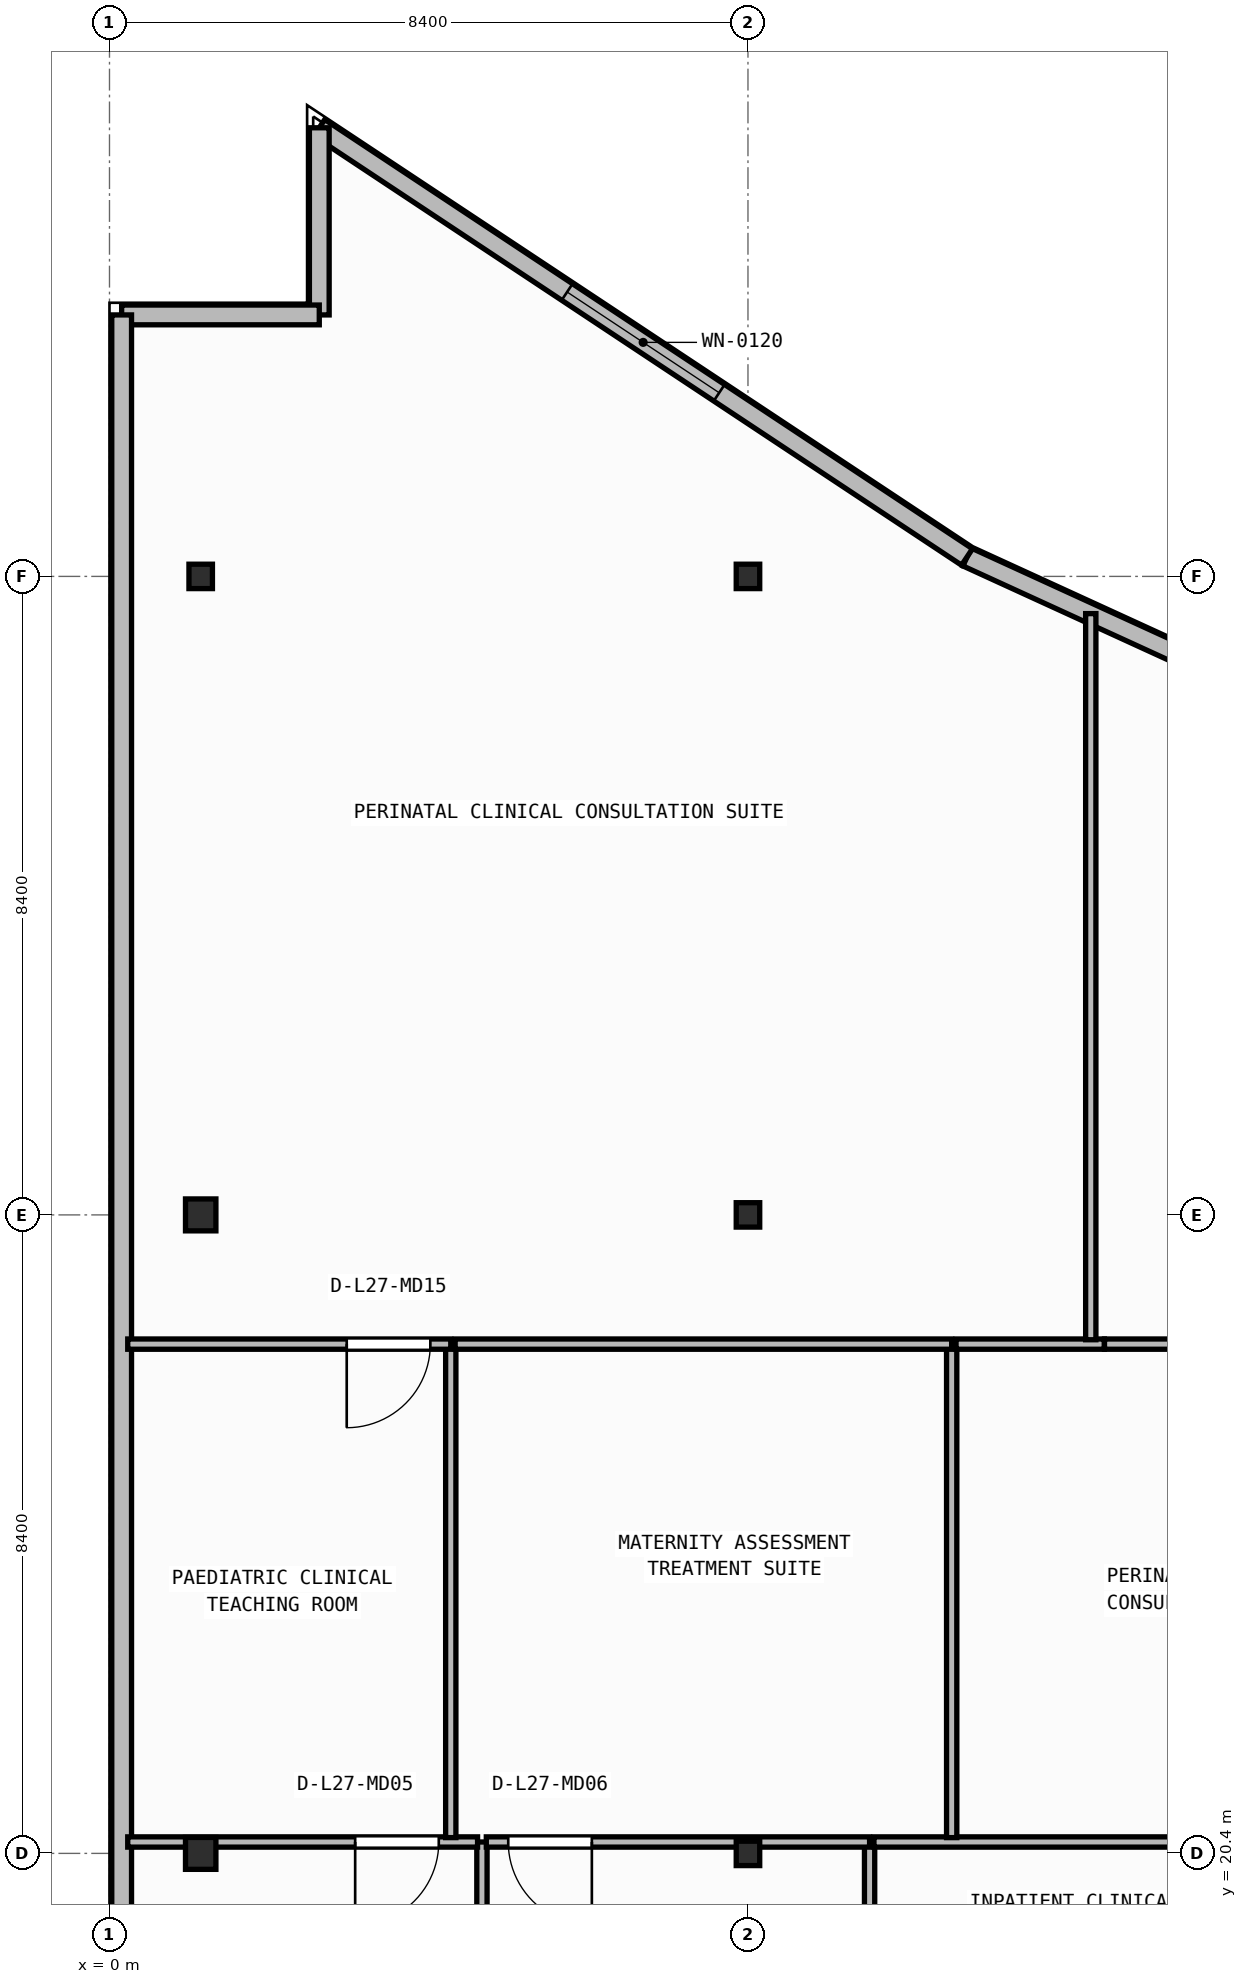
"""IFC4 building model, lengths in metres.
Left out: names, types, materials, properties, quantities, classifications, styles, units other than length and angle.
Written with IfcOpenShell. Run it as: python <this file> out.ifc"""

import sys

from ifc_helpers import new_model, si_unit, direction, frame, frame_2d, origin, origin_2d, place, context, subcontext, project, spatial, rectangle, i_section, extrude, element, fill, save


model = new_model("IFC4")
c1 = context("Model", 3, precision=1e-05, world=origin(), true_north=direction((0.0, 1.0)))
c2 = subcontext(c1, "Body", "Model", "MODEL_VIEW")
j1 = project(units=[si_unit("LENGTHUNIT", "METRE"), si_unit("PLANEANGLEUNIT", "RADIAN")], contexts=[c1])
p1 = place(None, origin())
s1 = spatial("IfcSite", under=j1, at=p1, CompositionType="ELEMENT")
p2 = place(p1, origin())
s2 = spatial("IfcBuilding", under=s1, at=p2, CompositionType="ELEMENT")
p3 = place(p2, frame((0.0, 0.0, 111.25)))
s3 = spatial("IfcBuildingStorey", under=s2, at=p3, CompositionType="ELEMENT", Elevation=111.25)
p4 = place(p3, frame((1.2, 20.4, 0.0), z_axis=(0.0, 0.0, 1.0), x_axis=(1.0, 0.0, 0.0)))
e1 = element("IfcColumn", 1, at=p4, inside=s3, PredefinedType="COLUMN", context=c2, shape_type="SweptSolid", body=[
    extrude(i_section(OverallWidth=0.4, OverallDepth=0.42, WebThickness=0.025, FlangeThickness=0.04, at=origin_2d()), origin(), (0.0, 0.0, 1.0), 3.95),
])
p5 = place(p3, frame((8.4, 20.4, 0.0), z_axis=(0.0, 0.0, 1.0), x_axis=(1.0, 0.0, 0.0)))
e2 = element("IfcColumn", 2, at=p5, inside=s3, PredefinedType="COLUMN", context=c2, shape_type="SweptSolid", body=[
    extrude(i_section(OverallWidth=0.309, OverallDepth=0.321, WebThickness=0.014, FlangeThickness=0.022, FilletRadius=0.017, at=origin_2d()), origin(), (0.0, 0.0, 1.0), 3.95),
])
p6 = place(p3, frame((1.2, 28.8, 0.0), z_axis=(0.0, 0.0, 1.0), x_axis=(1.0, 0.0, 0.0)))
e3 = element("IfcColumn", 3, at=p6, inside=s3, PredefinedType="COLUMN", context=c2, shape_type="SweptSolid", body=[
    extrude(i_section(OverallWidth=0.4, OverallDepth=0.42, WebThickness=0.025, FlangeThickness=0.04, at=origin_2d()), origin(), (0.0, 0.0, 1.0), 3.95),
])
for number, where, z_axis, x_axis in (
    (4, (8.4, 28.8, 0.0), (0.0, 0.0, 1.0), (1.0, 0.0, 0.0)),
    (5, (1.2, 37.2, 0.0), (0.0, 0.0, 1.0), (1.0, 0.0, 0.0)),
    (6, (8.4, 37.2, 0.0), (0.0, 0.0, 1.0), (1.0, 0.0, 0.0)),
):
    element("IfcColumn", number, at=place(p3, frame(where, z_axis=z_axis, x_axis=x_axis)), inside=s3, PredefinedType="COLUMN", context=c2, shape_type="SweptSolid", body=[
        extrude(i_section(OverallWidth=0.309, OverallDepth=0.321, WebThickness=0.014, FlangeThickness=0.022, FilletRadius=0.017, at=origin_2d()), origin(), (0.0, 0.0, 1.0), 3.95),
    ])
p7 = place(p3, frame((23.818, 31.716, 0.0), z_axis=(0.0, 0.0, 1.0), x_axis=(-0.909209527513, 0.416338846471, 0.0)))
e7 = element("IfcWall", 7, at=p7, inside=s3, PredefinedType="STANDARD", context=c2, shape_type="SweptSolid", body=[
    extrude(rectangle(XDim=13.787, YDim=0.26, at=frame_2d((6.894, 0.0))), origin(), (0.0, 0.0, 1.0), 3.71),
])
p8 = place(p7, frame((5.694, 0.0, 0.9)))
e8 = element("IfcOpeningElement", 8, at=p8, cuts=e7, PredefinedType="OPENING", context=c2, shape_type="SweptSolid", body=[
    extrude(rectangle(XDim=2.4, YDim=1.65, at=frame_2d((1.2, 0.825))), frame((0.0, 0.14, 0.0), z_axis=(0.0, -1.0, 0.0), x_axis=(1.0, 0.0, 0.0)), (0.0, 0.0, 1.0), 0.28),
])
p9 = place(p3, frame((11.282, 37.456, 0.0), z_axis=(0.0, 0.0, 1.0), x_axis=(-0.833630474253, 0.552322580017, 0.0)))
e9 = element("IfcWall", 9, at=p9, inside=s3, PredefinedType="STANDARD", context=c2, shape_type="SweptSolid", body=[
    extrude(rectangle(XDim=10.223, YDim=0.26, at=frame_2d((5.111, 0.0))), origin(), (0.0, 0.0, 1.0), 3.71),
])
p10 = place(p9, frame((3.911, 0.0, 0.9)))
e10 = element("IfcOpeningElement", 10, at=p10, cuts=e9, PredefinedType="OPENING", context=c2, shape_type="SweptSolid", body=[
    extrude(rectangle(XDim=2.4, YDim=1.65, at=frame_2d((1.2, 0.825))), frame((0.0, 0.14, 0.0), z_axis=(0.0, -1.0, 0.0), x_axis=(1.0, 0.0, 0.0)), (0.0, 0.0, 1.0), 0.28),
])
p11 = place(p3, frame((2.76, 43.102, 0.0), z_axis=(0.0, 0.0, 1.0), x_axis=(0.0, -1.0, 0.0)))
e11 = element("IfcWall", 11, at=p11, inside=s3, PredefinedType="STANDARD", context=c2, shape_type="SweptSolid", body=[
    extrude(rectangle(XDim=2.462, YDim=0.26, at=frame_2d((1.231, 0.0))), origin(), (0.0, 0.0, 1.0), 3.71),
])
p12 = place(p3, frame((2.76, 40.64, 0.0), z_axis=(0.0, 0.0, 1.0), x_axis=(-1.0, 0.0, 0.0)))
e12 = element("IfcWall", 12, at=p12, inside=s3, PredefinedType="STANDARD", context=c2, shape_type="SweptSolid", body=[
    extrude(rectangle(XDim=2.6, YDim=0.26, at=frame_2d((1.3, 0.0))), origin(), (0.0, 0.0, 1.0), 3.71),
])
p13 = place(p3, frame((0.16, 40.64, 0.0), z_axis=(0.0, 0.0, 1.0), x_axis=(0.0, -1.0, 0.0)))
e13 = element("IfcWall", 13, at=p13, inside=s3, PredefinedType="STANDARD", context=c2, shape_type="SweptSolid", body=[
    extrude(rectangle(XDim=37.88, YDim=0.26, at=frame_2d((18.94, 0.0))), origin(), (0.0, 0.0, 1.0), 3.71),
])
p14 = place(p13, frame((27.795, 0.0, 0.9)))
e14 = element("IfcOpeningElement", 14, at=p14, cuts=e13, PredefinedType="OPENING", context=c2, shape_type="SweptSolid", body=[
    extrude(rectangle(XDim=2.4, YDim=1.65, at=frame_2d((1.2, 0.825))), frame((0.0, 0.14, 0.0), z_axis=(0.0, -1.0, 0.0), x_axis=(1.0, 0.0, 0.0)), (0.0, 0.0, 1.0), 0.28),
])
p15 = place(p3, frame((4.9, 18.04, 0.0), z_axis=(0.0, 0.0, 1.0), x_axis=(0.0, 1.0, 0.0)))
e15 = element("IfcWall", 15, at=p15, inside=s3, PredefinedType="PARTITIONING", context=c2, shape_type="SweptSolid", body=[
    extrude(rectangle(XDim=2.51, YDim=0.135, at=frame_2d((1.255, 0.0))), origin(), (0.0, 0.0, 1.0), 3.71),
])
p16 = place(p3, frame((4.843, 20.55, 0.0), z_axis=(0.0, 0.0, 1.0), x_axis=(-1.0, 0.0, 0.0)))
e16 = element("IfcWall", 16, at=p16, inside=s3, PredefinedType="PARTITIONING", context=c2, shape_type="SweptSolid", body=[
    extrude(rectangle(XDim=4.603, YDim=0.135, at=frame_2d((2.301, 0.0))), origin(), (0.0, 0.0, 1.0), 3.083),
])
p17 = place(p16, frame((0.51, 0.0, 0.0)))
e17 = element("IfcOpeningElement", 17, at=p17, cuts=e16, PredefinedType="OPENING", context=c2, shape_type="SweptSolid", body=[
    extrude(rectangle(XDim=1.1, YDim=2.1, at=frame_2d((0.55, 1.05))), frame((0.0, 0.077, 0.0), z_axis=(0.0, -1.0, 0.0), x_axis=(1.0, 0.0, 0.0)), (0.0, 0.0, 1.0), 0.155),
])
p18 = place(p3, frame((10.0, 17.833, 0.0), z_axis=(0.0, 0.0, 1.0), x_axis=(0.0, 1.0, 0.0)))
e18 = element("IfcWall", 18, at=p18, inside=s3, PredefinedType="PARTITIONING", context=c2, shape_type="SweptSolid", body=[
    extrude(rectangle(XDim=2.718, YDim=0.135, at=frame_2d((1.359, 0.0))), origin(), (0.0, 0.0, 1.0), 3.71),
])
p19 = place(p3, frame((10.0, 20.55, 0.0), z_axis=(0.0, 0.0, 1.0), x_axis=(-1.0, 0.0, 0.0)))
e19 = element("IfcWall", 19, at=p19, inside=s3, PredefinedType="PARTITIONING", context=c2, shape_type="SweptSolid", body=[
    extrude(rectangle(XDim=5.042, YDim=0.135, at=frame_2d((2.521, 0.0))), origin(), (0.0, 0.0, 1.0), 3.083),
])
p20 = place(p19, frame((3.654, 0.0, 0.0)))
e20 = element("IfcOpeningElement", 20, at=p20, cuts=e19, PredefinedType="OPENING", context=c2, shape_type="SweptSolid", body=[
    extrude(rectangle(XDim=1.1, YDim=2.1, at=frame_2d((0.55, 1.05))), frame((0.0, 0.077, 0.0), z_axis=(0.0, -1.0, 0.0), x_axis=(1.0, 0.0, 0.0)), (0.0, 0.0, 1.0), 0.155),
])
p21 = place(p3, frame((14.34, 20.55, 0.0), z_axis=(0.0, 0.0, 1.0), x_axis=(-1.0, 0.0, 0.0)))
e21 = element("IfcWall", 21, at=p21, inside=s3, PredefinedType="PARTITIONING", context=c2, shape_type="SweptSolid", body=[
    extrude(rectangle(XDim=4.282, YDim=0.135, at=frame_2d((2.141, 0.0))), origin(), (0.0, 0.0, 1.0), 3.083),
])
p22 = place(p3, frame((4.49, 20.607, 0.0), z_axis=(0.0, 0.0, 1.0), x_axis=(0.0, 1.0, 0.0)))
e22 = element("IfcWall", 22, at=p22, inside=s3, PredefinedType="PARTITIONING", context=c2, shape_type="SweptSolid", body=[
    extrude(rectangle(XDim=6.493, YDim=0.135, at=frame_2d((3.246, 0.0))), origin(), (0.0, 0.0, 1.0), 3.71),
])
p23 = place(p3, frame((4.49, 27.1, 0.0), z_axis=(0.0, 0.0, 1.0), x_axis=(-1.0, 0.0, 0.0)))
e23 = element("IfcWall", 23, at=p23, inside=s3, PredefinedType="PARTITIONING", context=c2, shape_type="SweptSolid", body=[
    extrude(rectangle(XDim=4.25, YDim=0.135, at=frame_2d((2.125, 0.0))), origin(), (0.0, 0.0, 1.0), 3.71),
])
p24 = place(p23, frame((0.269, 0.0, 0.0)))
e24 = element("IfcOpeningElement", 24, at=p24, cuts=e23, PredefinedType="OPENING", context=c2, shape_type="SweptSolid", body=[
    extrude(rectangle(XDim=1.1, YDim=2.1, at=frame_2d((0.55, 1.05))), frame((0.0, 0.077, 0.0), z_axis=(0.0, -1.0, 0.0), x_axis=(1.0, 0.0, 0.0)), (0.0, 0.0, 1.0), 0.155),
])
p25 = place(p3, frame((11.08, 20.607, 0.0), z_axis=(0.0, 0.0, 1.0), x_axis=(0.0, 1.0, 0.0)))
e25 = element("IfcWall", 25, at=p25, inside=s3, PredefinedType="PARTITIONING", context=c2, shape_type="SweptSolid", body=[
    extrude(rectangle(XDim=6.493, YDim=0.135, at=frame_2d((3.246, 0.0))), origin(), (0.0, 0.0, 1.0), 3.71),
])
p26 = place(p3, frame((11.08, 27.1, 0.0), z_axis=(0.0, 0.0, 1.0), x_axis=(-1.0, 0.0, 0.0)))
e26 = element("IfcWall", 26, at=p26, inside=s3, PredefinedType="PARTITIONING", context=c2, shape_type="SweptSolid", body=[
    extrude(rectangle(XDim=6.532, YDim=0.135, at=frame_2d((3.266, 0.0))), origin(), (0.0, 0.0, 1.0), 3.71),
])
p27 = place(p3, frame((13.088, 27.1, 0.0), z_axis=(0.0, 0.0, 1.0), x_axis=(-1.0, 0.0, 0.0)))
e27 = element("IfcWall", 27, at=p27, inside=s3, PredefinedType="PARTITIONING", context=c2, shape_type="SweptSolid", body=[
    extrude(rectangle(XDim=1.951, YDim=0.135, at=frame_2d((0.976, 0.0))), origin(), (0.0, 0.0, 1.0), 3.71),
])
p28 = place(p3, frame((19.12, 27.1, 0.0), z_axis=(0.0, 0.0, 1.0), x_axis=(-1.0, 0.0, 0.0)))
e28 = element("IfcWall", 28, at=p28, inside=s3, PredefinedType="PARTITIONING", context=c2, shape_type="SweptSolid", body=[
    extrude(rectangle(XDim=6.03, YDim=0.135, at=frame_2d((3.015, 0.0))), origin(), (0.0, 0.0, 1.0), 3.71),
])
p29 = place(p3, frame((12.91, 27.157, 0.0), z_axis=(0.0, 0.0, 1.0), x_axis=(0.0, 1.0, 0.0)))
e29 = element("IfcWall", 29, at=p29, inside=s3, PredefinedType="PARTITIONING", context=c2, shape_type="SweptSolid", body=[
    extrude(rectangle(XDim=9.553, YDim=0.135, at=frame_2d((4.776, 0.0))), origin(), (0.0, 0.0, 1.0), 3.71),
])
p30 = place(p10, origin())
e30 = element("IfcWindow", 30, at=p30, inside=s3, PartitioningType="SINGLE_PANEL", PredefinedType="WINDOW", context=c2, shape_type="SweptSolid", body=[
    extrude(rectangle(XDim=2.4, YDim=1.65, at=frame_2d((1.2, 0.825))), frame((0.0, 0.03, 0.0), z_axis=(0.0, -1.0, 0.0), x_axis=(1.0, 0.0, 0.0)), (0.0, 0.0, 1.0), 0.06),
])
fill(e10, e30)
p31 = place(p17, origin())
e31 = element("IfcDoor", 31, at=p31, inside=s3, OperationType="SINGLE_SWING_RIGHT", PredefinedType="DOOR", context=c2, shape_type="SweptSolid", body=[
    extrude(rectangle(XDim=1.1, YDim=2.1, at=frame_2d((0.55, 1.05))), frame((0.0, 0.025, 0.0), z_axis=(0.0, -1.0, 0.0), x_axis=(1.0, 0.0, 0.0)), (0.0, 0.0, 1.0), 0.05),
])
fill(e17, e31)
p32 = place(p20, origin())
e32 = element("IfcDoor", 32, at=p32, inside=s3, OperationType="SINGLE_SWING_LEFT", PredefinedType="DOOR", context=c2, shape_type="SweptSolid", body=[
    extrude(rectangle(XDim=1.1, YDim=2.1, at=frame_2d((0.55, 1.05))), frame((0.0, 0.025, 0.0), z_axis=(0.0, -1.0, 0.0), x_axis=(1.0, 0.0, 0.0)), (0.0, 0.0, 1.0), 0.05),
])
fill(e20, e32)
p33 = place(p24, origin())
e33 = element("IfcDoor", 33, at=p33, inside=s3, OperationType="SINGLE_SWING_RIGHT", PredefinedType="DOOR", context=c2, shape_type="SweptSolid", body=[
    extrude(rectangle(XDim=1.1, YDim=2.1, at=frame_2d((0.55, 1.05))), frame((0.0, 0.025, 0.0), z_axis=(0.0, -1.0, 0.0), x_axis=(1.0, 0.0, 0.0)), (0.0, 0.0, 1.0), 0.05),
])
fill(e24, e33)
save(model, sys.argv[1])
